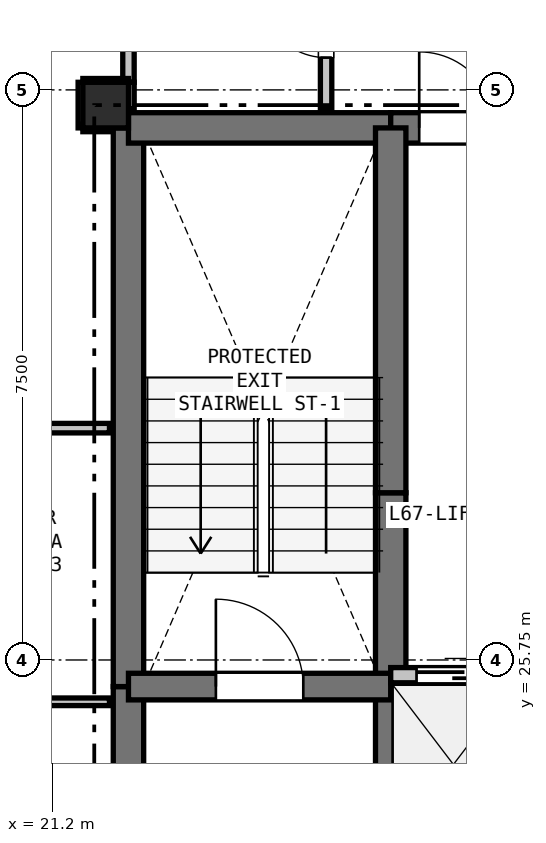
"""IFC4 building model, lengths in metres.
Left out: names, types, materials, properties, quantities, classifications, styles, units other than length and angle.
Written with IfcOpenShell. Run it as: python <this file> out.ifc"""

import sys

from ifc_helpers import new_model, si_unit, direction, frame, frame_2d, origin, origin_2d, place, context, subcontext, project, spatial, rectangle, extrude, element, fill, save


model = new_model("IFC4")
c1 = context("Model", 3, precision=1e-05, world=origin(), true_north=direction((0.0, 1.0)))
c2 = subcontext(c1, "Body", "Model", "MODEL_VIEW")
j1 = project(units=[si_unit("LENGTHUNIT", "METRE"), si_unit("PLANEANGLEUNIT", "RADIAN")], contexts=[c1])
p1 = place(None, origin())
s1 = spatial("IfcSite", under=j1, at=p1, CompositionType="ELEMENT")
p2 = place(p1, origin())
s2 = spatial("IfcBuilding", under=s1, at=p2, CompositionType="ELEMENT")
p3 = place(p2, frame((0.0, 0.0, 239.7)))
s3 = spatial("IfcBuildingStorey", under=s2, at=p3, CompositionType="ELEMENT", Elevation=239.7)
p4 = place(p3, frame((21.9, 33.05, 0.0), z_axis=(0.0, 0.0, 1.0), x_axis=(1.0, 0.0, 0.0)))
e1 = element("IfcColumn", 1, at=p4, inside=s3, PredefinedType="COLUMN", context=c2, shape_type="SweptSolid", body=[
    extrude(rectangle(XDim=0.6, YDim=0.6, at=origin_2d()), origin(), (0.0, 0.0, 1.0), 3.3),
])
p5 = place(p3, frame((22.2, 20.75, 0.0), z_axis=(0.0, 0.0, 1.0), x_axis=(0.0, 1.0, 0.0)))
e2 = element("IfcWall", 2, at=p5, inside=s3, PredefinedType="SHEAR", context=c2, shape_type="SweptSolid", body=[
    extrude(rectangle(XDim=4.65, YDim=0.4, at=frame_2d((2.325, 0.0))), origin(), (0.0, 0.0, 1.0), 3.08),
])
p6 = place(p3, frame((22.2, 25.4, 0.0), z_axis=(0.0, 0.0, 1.0), x_axis=(0.0, 1.0, 0.0)))
e3 = element("IfcWall", 3, at=p6, inside=s3, PredefinedType="SHEAR", context=c2, shape_type="SweptSolid", body=[
    extrude(rectangle(XDim=7.35, YDim=0.4, at=frame_2d((3.675, 0.0))), origin(), (0.0, 0.0, 1.0), 3.08),
])
p7 = place(p3, frame((22.2, 32.75, 0.0), z_axis=(0.0, 0.0, 1.0), x_axis=(1.0, 0.0, 0.0)))
e4 = element("IfcWall", 4, at=p7, inside=s3, PredefinedType="SHEAR", context=c2, shape_type="SweptSolid", body=[
    extrude(rectangle(XDim=3.45, YDim=0.4, at=frame_2d((1.725, 0.0))), origin(), (0.0, 0.0, 1.0), 3.08),
])
p8 = place(p3, frame((25.65, 32.75, 0.0), z_axis=(0.0, 0.0, 1.0), x_axis=(1.0, 0.0, 0.0)))
e5 = element("IfcWall", 5, at=p8, inside=s3, PredefinedType="SHEAR", context=c2, shape_type="SweptSolid", body=[
    extrude(rectangle(XDim=1.75, YDim=0.4, at=frame_2d((0.875, 0.0))), origin(), (0.0, 0.0, 1.0), 3.08),
])
p9 = place(p8, frame((0.375, 0.0, 0.0)))
e6 = element("IfcOpeningElement", 6, at=p9, cuts=e5, PredefinedType="OPENING", context=c2, shape_type="SweptSolid", body=[
    extrude(rectangle(XDim=1.0, YDim=2.15, at=frame_2d((0.5, 1.075))), frame((0.0, 0.21, 0.0), z_axis=(0.0, -1.0, 0.0), x_axis=(1.0, 0.0, 0.0)), (0.0, 0.0, 1.0), 0.42),
])
p10 = place(p3, frame((25.65, 22.75, 0.0), z_axis=(0.0, 0.0, 1.0), x_axis=(0.0, 1.0, 0.0)))
e7 = element("IfcWall", 7, at=p10, inside=s3, PredefinedType="SHEAR", context=c2, shape_type="SweptSolid", body=[
    extrude(rectangle(XDim=2.8, YDim=0.4, at=frame_2d((1.4, 0.0))), origin(), (0.0, 0.0, 1.0), 3.08),
])
p11 = place(p3, frame((25.65, 25.55, 0.0), z_axis=(0.0, 0.0, 1.0), x_axis=(0.0, 1.0, 0.0)))
e8 = element("IfcWall", 8, at=p11, inside=s3, PredefinedType="SHEAR", context=c2, shape_type="SweptSolid", body=[
    extrude(rectangle(XDim=2.4, YDim=0.4, at=frame_2d((1.2, 0.0))), origin(), (0.0, 0.0, 1.0), 3.08),
])
p12 = place(p3, frame((25.65, 27.95, 0.0), z_axis=(0.0, 0.0, 1.0), x_axis=(0.0, 1.0, 0.0)))
e9 = element("IfcWall", 9, at=p12, inside=s3, PredefinedType="SHEAR", context=c2, shape_type="SweptSolid", body=[
    extrude(rectangle(XDim=4.8, YDim=0.4, at=frame_2d((2.4, 0.0))), origin(), (0.0, 0.0, 1.0), 3.08),
])
p13 = place(p3, frame((22.2, 25.4, 0.0), z_axis=(0.0, 0.0, 1.0), x_axis=(1.0, 0.0, 0.0)))
e10 = element("IfcWall", 10, at=p13, inside=s3, PredefinedType="SHEAR", context=c2, shape_type="SweptSolid", body=[
    extrude(rectangle(XDim=3.45, YDim=0.35, at=frame_2d((1.725, 0.0))), origin(), (0.0, 0.0, 1.0), 3.08),
])
p14 = place(p13, frame((1.15, 0.0, 0.0)))
e11 = element("IfcOpeningElement", 11, at=p14, cuts=e10, PredefinedType="OPENING", context=c2, shape_type="SweptSolid", body=[
    extrude(rectangle(XDim=1.15, YDim=2.15, at=frame_2d((0.575, 1.075))), frame((0.0, 0.185, 0.0), z_axis=(0.0, -1.0, 0.0), x_axis=(1.0, 0.0, 0.0)), (0.0, 0.0, 1.0), 0.37),
])
p15 = place(p3, frame((25.65, 25.55, 0.0), z_axis=(0.0, 0.0, 1.0), x_axis=(1.0, 0.0, 0.0)))
e12 = element("IfcWall", 12, at=p15, inside=s3, PredefinedType="PARTITIONING", context=c2, shape_type="SweptSolid", body=[
    extrude(rectangle(XDim=4.95, YDim=0.2, at=frame_2d((2.475, 0.0))), origin(), (0.0, 0.0, 1.0), 3.08),
])
p16 = place(p15, frame((0.34, 0.0, 0.0)))
e13 = element("IfcOpeningElement", 13, at=p16, cuts=e12, PredefinedType="OPENING", context=c2, shape_type="SweptSolid", body=[
    extrude(rectangle(XDim=1.1, YDim=2.15, at=frame_2d((0.55, 1.075))), frame((0.0, 0.11, 0.0), z_axis=(0.0, -1.0, 0.0), x_axis=(1.0, 0.0, 0.0)), (0.0, 0.0, 1.0), 0.22),
])
p17 = place(p15, frame((1.99, 0.0, 0.0)))
e14 = element("IfcOpeningElement", 14, at=p17, cuts=e12, PredefinedType="OPENING", context=c2, shape_type="SweptSolid", body=[
    extrude(rectangle(XDim=1.1, YDim=2.15, at=frame_2d((0.55, 1.075))), frame((0.0, 0.11, 0.0), z_axis=(0.0, -1.0, 0.0), x_axis=(1.0, 0.0, 0.0)), (0.0, 0.0, 1.0), 0.22),
])
p18 = place(p15, frame((3.64, 0.0, 0.0)))
e15 = element("IfcOpeningElement", 15, at=p18, cuts=e12, PredefinedType="OPENING", context=c2, shape_type="SweptSolid", body=[
    extrude(rectangle(XDim=1.1, YDim=2.15, at=frame_2d((0.55, 1.075))), frame((0.0, 0.11, 0.0), z_axis=(0.0, -1.0, 0.0), x_axis=(1.0, 0.0, 0.0)), (0.0, 0.0, 1.0), 0.22),
])
p19 = place(p3, frame((24.8, 33.0, 0.0), z_axis=(0.0, 0.0, 1.0), x_axis=(0.0, 1.0, 0.0)))
e16 = element("IfcWall", 16, at=p19, inside=s3, PredefinedType="PARTITIONING", context=c2, shape_type="SweptSolid", body=[
    extrude(rectangle(XDim=2.2, YDim=0.15, at=frame_2d((1.1, 0.0))), origin(), (0.0, 0.0, 1.0), 2.605),
])
p20 = place(p19, frame((0.675, 0.0, 0.0)))
e17 = element("IfcOpeningElement", 17, at=p20, cuts=e16, PredefinedType="OPENING", context=c2, shape_type="SweptSolid", body=[
    extrude(rectangle(XDim=0.85, YDim=2.1, at=frame_2d((0.425, 1.05))), frame((0.0, 0.085, 0.0), z_axis=(0.0, -1.0, 0.0), x_axis=(1.0, 0.0, 0.0)), (0.0, 0.0, 1.0), 0.17),
])
p21 = place(p3, frame((16.8, 25.2, 0.0), z_axis=(0.0, 0.0, 1.0), x_axis=(1.0, 0.0, 0.0)))
e18 = element("IfcWall", 18, at=p21, inside=s3, PredefinedType="PARTITIONING", context=c2, shape_type="SweptSolid", body=[
    extrude(rectangle(XDim=5.15, YDim=0.1, at=frame_2d((2.575, 0.0))), origin(), (0.0, 0.0, 1.0), 2.605),
])
p22 = place(p21, frame((2.125, 0.0, 0.0)))
e19 = element("IfcOpeningElement", 19, at=p22, cuts=e18, PredefinedType="OPENING", context=c2, shape_type="SweptSolid", body=[
    extrude(rectangle(XDim=0.9, YDim=2.1, at=frame_2d((0.45, 1.05))), frame((0.0, 0.06, 0.0), z_axis=(0.0, -1.0, 0.0), x_axis=(1.0, 0.0, 0.0)), (0.0, 0.0, 1.0), 0.12),
])
p23 = place(p3, frame((22.2, 33.0, 0.0), z_axis=(0.0, 0.0, 1.0), x_axis=(0.0, 1.0, 0.0)))
e20 = element("IfcWall", 20, at=p23, inside=s3, PredefinedType="PARTITIONING", context=c2, shape_type="SweptSolid", body=[
    extrude(rectangle(XDim=0.35, YDim=0.15, at=frame_2d((0.175, 0.0))), origin(), (0.0, 0.0, 1.0), 2.605),
])
p24 = place(p3, frame((22.2, 33.35, 0.0), z_axis=(0.0, 0.0, 1.0), x_axis=(0.0, 1.0, 0.0)))
e21 = element("IfcWall", 21, at=p24, inside=s3, PredefinedType="PARTITIONING", context=c2, shape_type="SweptSolid", body=[
    extrude(rectangle(XDim=1.833, YDim=0.15, at=frame_2d((0.916, 0.0))), origin(), (0.0, 0.0, 1.0), 2.365),
])
p25 = place(p24, frame((0.491, 0.0, 0.0)))
e22 = element("IfcOpeningElement", 22, at=p25, cuts=e21, PredefinedType="OPENING", context=c2, shape_type="SweptSolid", body=[
    extrude(rectangle(XDim=0.85, YDim=2.1, at=frame_2d((0.425, 1.05))), frame((0.0, 0.085, 0.0), z_axis=(0.0, -1.0, 0.0), x_axis=(1.0, 0.0, 0.0)), (0.0, 0.0, 1.0), 0.17),
])
p26 = place(p3, frame((22.2, 33.35, 0.0), z_axis=(0.0, 0.0, 1.0), x_axis=(-1.0, 0.0, 0.0)))
e23 = element("IfcWall", 23, at=p26, inside=s3, PredefinedType="PARTITIONING", context=c2, shape_type="SweptSolid", body=[
    extrude(rectangle(XDim=0.6, YDim=0.1, at=frame_2d((0.3, 0.0))), origin(), (0.0, 0.0, 1.0), 3.08),
])
p27 = place(p3, frame((21.6, 33.35, 0.0), z_axis=(0.0, 0.0, 1.0), x_axis=(0.0, -1.0, 0.0)))
e24 = element("IfcWall", 24, at=p27, inside=s3, PredefinedType="PARTITIONING", context=c2, shape_type="SweptSolid", body=[
    extrude(rectangle(XDim=0.6, YDim=0.125, at=frame_2d((0.3, 0.0))), origin(), (0.0, 0.0, 1.0), 2.528),
])
p28 = place(p3, frame((21.6, 32.75, 0.0), z_axis=(0.0, 0.0, 1.0), x_axis=(1.0, 0.0, 0.0)))
e25 = element("IfcWall", 25, at=p28, inside=s3, PredefinedType="PARTITIONING", context=c2, shape_type="SweptSolid", body=[
    extrude(rectangle(XDim=0.35, YDim=0.1, at=frame_2d((0.175, 0.0))), origin(), (0.0, 0.0, 1.0), 2.605),
])
p29 = place(p3, frame((21.95, 28.8, 0.0), z_axis=(0.0, 0.0, 1.0), x_axis=(-1.0, 0.0, 0.0)))
e26 = element("IfcWall", 26, at=p29, inside=s3, PredefinedType="PARTITIONING", context=c2, shape_type="SweptSolid", body=[
    extrude(rectangle(XDim=5.15, YDim=0.125, at=frame_2d((2.575, 0.0))), origin(), (0.0, 0.0, 1.0), 2.605),
])
p30 = place(p16, origin())
e27 = element("IfcDoor", 27, at=p30, inside=s3, OperationType="SLIDING_TO_LEFT", PredefinedType="DOOR", context=c2, shape_type="SweptSolid", body=[
    extrude(rectangle(XDim=1.1, YDim=2.15, at=frame_2d((0.55, 1.075))), frame((0.0, 0.025, 0.0), z_axis=(0.0, -1.0, 0.0), x_axis=(1.0, 0.0, 0.0)), (0.0, 0.0, 1.0), 0.05),
])
fill(e13, e27)
p31 = place(p9, origin())
e28 = element("IfcDoor", 28, at=p31, inside=s3, OperationType="SINGLE_SWING_LEFT", PredefinedType="DOOR", context=c2, shape_type="SweptSolid", body=[
    extrude(rectangle(XDim=1.0, YDim=2.15, at=frame_2d((0.5, 1.075))), frame((0.0, 0.025, 0.0), z_axis=(0.0, -1.0, 0.0), x_axis=(1.0, 0.0, 0.0)), (0.0, 0.0, 1.0), 0.05),
])
fill(e6, e28)
p32 = place(p14, origin())
e29 = element("IfcDoor", 29, at=p32, inside=s3, OperationType="SINGLE_SWING_LEFT", PredefinedType="DOOR", context=c2, shape_type="SweptSolid", body=[
    extrude(rectangle(XDim=1.15, YDim=2.15, at=frame_2d((0.575, 1.075))), frame((0.0, 0.025, 0.0), z_axis=(0.0, -1.0, 0.0), x_axis=(1.0, 0.0, 0.0)), (0.0, 0.0, 1.0), 0.05),
])
fill(e11, e29)
p33 = place(p20, origin())
e30 = element("IfcDoor", 30, at=p33, inside=s3, OperationType="SINGLE_SWING_RIGHT", PredefinedType="DOOR", context=c2, shape_type="SweptSolid", body=[
    extrude(rectangle(XDim=0.85, YDim=2.1, at=frame_2d((0.425, 1.05))), frame((0.0, 0.025, 0.0), z_axis=(0.0, -1.0, 0.0), x_axis=(1.0, 0.0, 0.0)), (0.0, 0.0, 1.0), 0.05),
])
fill(e17, e30)
save(model, sys.argv[1])
